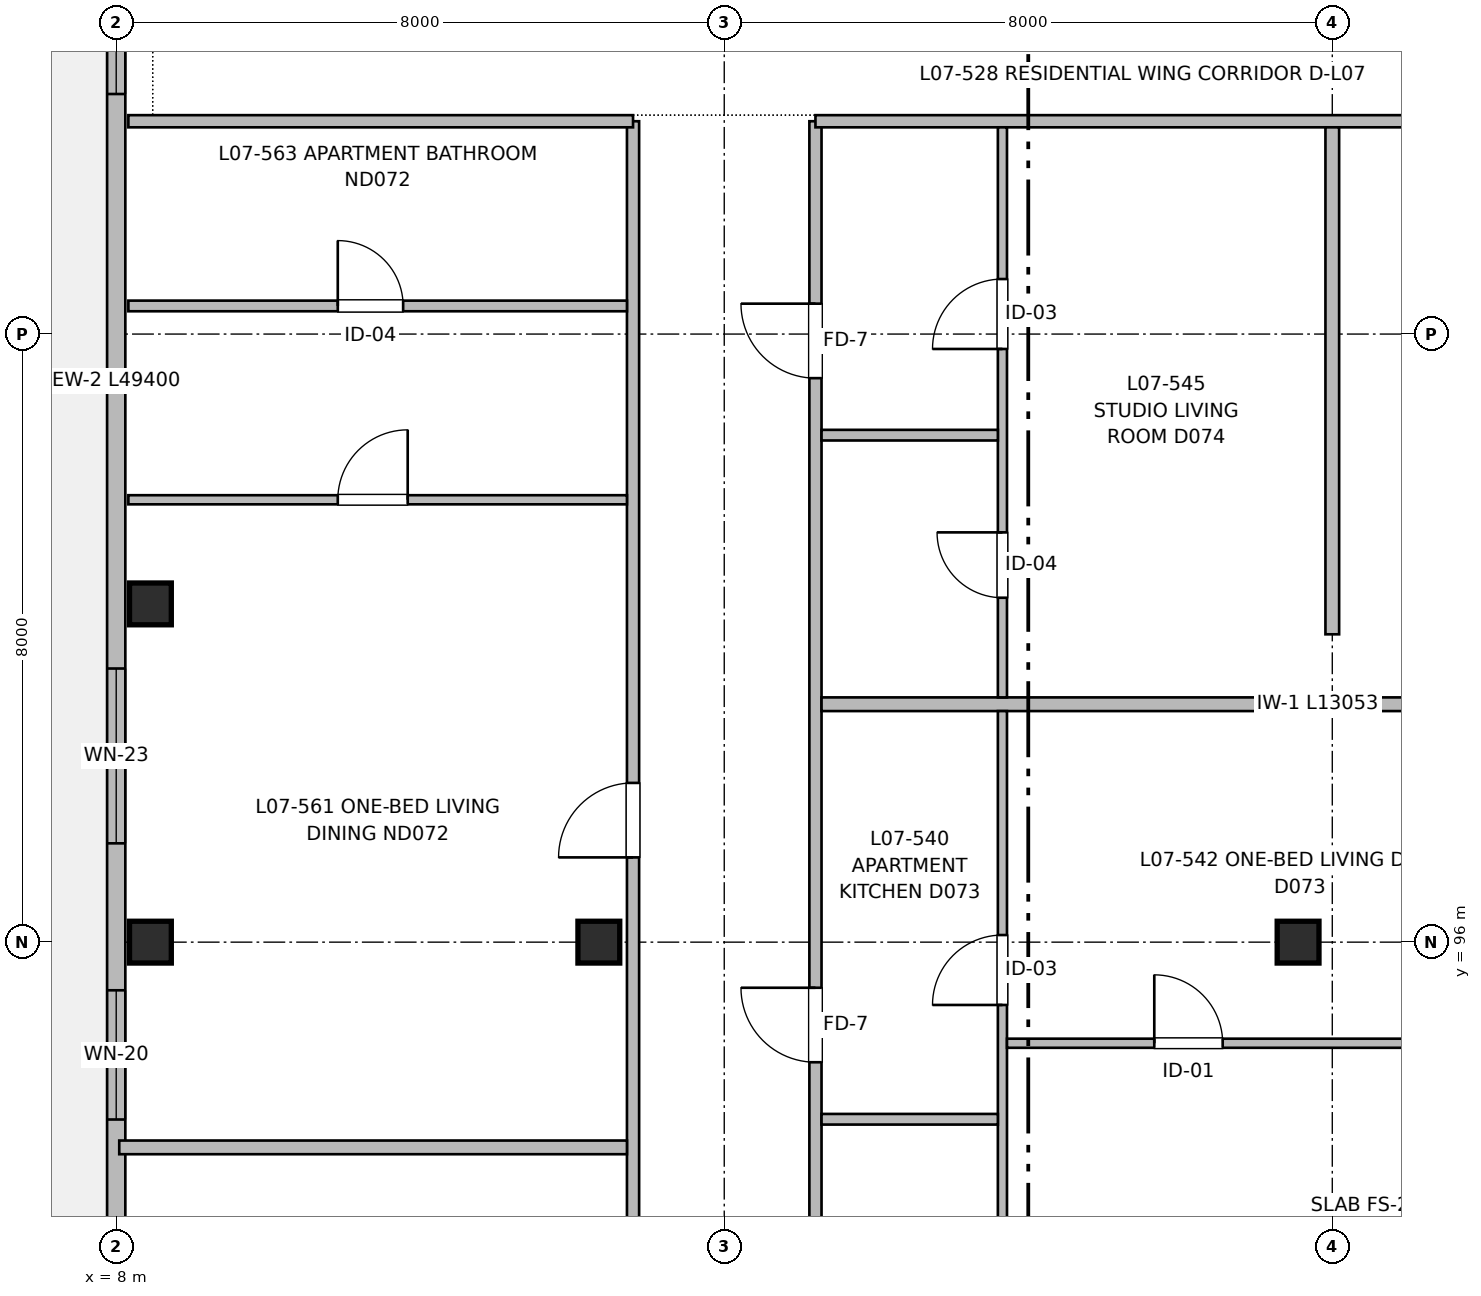
"""IFC4 building model, lengths in metres.
Left out: names, types, materials, properties, quantities, classifications, styles, units other than length and angle.
Written with IfcOpenShell. Run it as: python <this file> out.ifc"""

import sys

from ifc_helpers import new_model, si_unit, direction, frame, frame_2d, origin, origin_2d, place, context, subcontext, project, spatial, rectangle, extrude, element, fill, save


model = new_model("IFC4")
c1 = context("Model", 3, precision=1e-05, world=origin(), true_north=direction((0.0, 1.0)))
c2 = subcontext(c1, "Body", "Model", "MODEL_VIEW")
j1 = project(units=[si_unit("LENGTHUNIT", "METRE"), si_unit("PLANEANGLEUNIT", "RADIAN")], contexts=[c1])
p1 = place(None, origin())
s1 = spatial("IfcSite", under=j1, at=p1, CompositionType="ELEMENT")
p2 = place(p1, origin())
s2 = spatial("IfcBuilding", under=s1, at=p2, CompositionType="ELEMENT")
p3 = place(p2, frame((0.0, 0.0, 23.36)))
s3 = spatial("IfcBuildingStorey", under=s2, at=p3, CompositionType="ELEMENT", Elevation=23.36)
for number, where, z_axis, x_axis in (
    (1, (8.45, 96.0, 0.0), (0.0, 0.0, 1.0), (1.0, 0.0, 0.0)),
    (2, (8.45, 100.45, 0.0), (0.0, 0.0, 1.0), (1.0, 0.0, 0.0)),
    (3, (14.35, 96.0, 0.0), (0.0, 0.0, 1.0), (1.0, 0.0, 0.0)),
    (4, (23.55, 96.0, 0.0), (0.0, 0.0, 1.0), (1.0, 0.0, 0.0)),
):
    element("IfcColumn", number, at=place(p3, frame(where, z_axis=z_axis, x_axis=x_axis)), inside=s3, PredefinedType="COLUMN", context=c2, shape_type="SweptSolid", body=[
        extrude(rectangle(XDim=0.55, YDim=0.55, at=origin_2d()), origin(), (0.0, 0.0, 1.0), 3.2),
    ])
p4 = place(p3, frame((8.0, 64.4, 0.0), z_axis=(0.0, 0.0, 1.0), x_axis=(0.0, 1.0, 0.0)))
e5 = element("IfcWall", 5, at=p4, inside=s3, PredefinedType="SOLIDWALL", context=c2, shape_type="SweptSolid", body=[
    extrude(rectangle(XDim=49.4, YDim=0.24, at=frame_2d((24.7, 0.0))), origin(), (0.0, 0.0, 1.0), 2.98),
])
p5 = place(p4, frame((3.792, 0.0, 0.9)))
e6 = element("IfcOpeningElement", 6, at=p5, cuts=e5, PredefinedType="OPENING", context=c2, shape_type="SweptSolid", body=[
    extrude(rectangle(XDim=0.65, YDim=0.95, at=frame_2d((0.325, 0.475))), frame((0.0, 0.13, 0.0), z_axis=(0.0, -1.0, 0.0), x_axis=(1.0, 0.0, 0.0)), (0.0, 0.0, 1.0), 0.26),
])
p6 = place(p4, frame((11.8, 0.0, 0.62)))
e7 = element("IfcOpeningElement", 7, at=p6, cuts=e5, PredefinedType="OPENING", context=c2, shape_type="SweptSolid", body=[
    extrude(rectangle(XDim=1.1, YDim=1.6, at=frame_2d((0.55, 0.8))), frame((0.0, 0.13, 0.0), z_axis=(0.0, -1.0, 0.0), x_axis=(1.0, 0.0, 0.0)), (0.0, 0.0, 1.0), 0.26),
])
p7 = place(p4, frame((18.683, 0.0, 0.0)))
e8 = element("IfcOpeningElement", 8, at=p7, cuts=e5, PredefinedType="OPENING", context=c2, shape_type="SweptSolid", body=[
    extrude(rectangle(XDim=1.2, YDim=2.2, at=frame_2d((0.6, 1.1))), frame((0.0, 0.13, 0.0), z_axis=(0.0, -1.0, 0.0), x_axis=(1.0, 0.0, 0.0)), (0.0, 0.0, 1.0), 0.26),
])
p8 = place(p4, frame((21.883, 0.0, 0.72)))
e9 = element("IfcOpeningElement", 9, at=p8, cuts=e5, PredefinedType="OPENING", context=c2, shape_type="SweptSolid", body=[
    extrude(rectangle(XDim=1.8, YDim=1.5, at=frame_2d((0.9, 0.75))), frame((0.0, 0.13, 0.0), z_axis=(0.0, -1.0, 0.0), x_axis=(1.0, 0.0, 0.0)), (0.0, 0.0, 1.0), 0.26),
])
p9 = place(p4, frame((29.267, 0.0, 0.72)))
e10 = element("IfcOpeningElement", 10, at=p9, cuts=e5, PredefinedType="OPENING", context=c2, shape_type="SweptSolid", body=[
    extrude(rectangle(XDim=1.7, YDim=1.5, at=frame_2d((0.85, 0.75))), frame((0.0, 0.13, 0.0), z_axis=(0.0, -1.0, 0.0), x_axis=(1.0, 0.0, 0.0)), (0.0, 0.0, 1.0), 0.26),
])
p10 = place(p4, frame((32.9, 0.0, 0.57)))
e11 = element("IfcOpeningElement", 11, at=p10, cuts=e5, PredefinedType="OPENING", context=c2, shape_type="SweptSolid", body=[
    extrude(rectangle(XDim=2.3, YDim=1.65, at=frame_2d((1.15, 0.825))), frame((0.0, 0.13, 0.0), z_axis=(0.0, -1.0, 0.0), x_axis=(1.0, 0.0, 0.0)), (0.0, 0.0, 1.0), 0.26),
])
p11 = place(p4, frame((42.758, 0.0, 0.77)))
e12 = element("IfcOpeningElement", 12, at=p11, cuts=e5, PredefinedType="OPENING", context=c2, shape_type="SweptSolid", body=[
    extrude(rectangle(XDim=1.45, YDim=1.45, at=frame_2d((0.725, 0.725))), frame((0.0, 0.13, 0.0), z_axis=(0.0, -1.0, 0.0), x_axis=(1.0, 0.0, 0.0)), (0.0, 0.0, 1.0), 0.26),
])
p12 = place(p3, frame((14.8, 64.56, 0.0), z_axis=(0.0, 0.0, 1.0), x_axis=(0.0, 1.0, 0.0)))
e13 = element("IfcWall", 13, at=p12, inside=s3, PredefinedType="PARTITIONING", context=c2, shape_type="SweptSolid", body=[
    extrude(rectangle(XDim=42.24, YDim=0.16, at=frame_2d((21.12, 0.0))), origin(), (0.0, 0.0, 1.0), 2.935),
])
p13 = place(p12, frame((4.44, 0.0, 0.0)))
e14 = element("IfcOpeningElement", 14, at=p13, cuts=e13, PredefinedType="OPENING", context=c2, shape_type="SweptSolid", body=[
    extrude(rectangle(XDim=1.1, YDim=2.15, at=frame_2d((0.55, 1.075))), frame((0.0, 0.09, 0.0), z_axis=(0.0, -1.0, 0.0), x_axis=(1.0, 0.0, 0.0)), (0.0, 0.0, 1.0), 0.18),
])
p14 = place(p12, frame((10.84, 0.0, 0.0)))
e15 = element("IfcOpeningElement", 15, at=p14, cuts=e13, PredefinedType="OPENING", context=c2, shape_type="SweptSolid", body=[
    extrude(rectangle(XDim=1.6, YDim=2.15, at=frame_2d((0.8, 1.075))), frame((0.0, 0.09, 0.0), z_axis=(0.0, -1.0, 0.0), x_axis=(1.0, 0.0, 0.0)), (0.0, 0.0, 1.0), 0.18),
])
p15 = place(p12, frame((24.345, 0.0, 0.0)))
e16 = element("IfcOpeningElement", 16, at=p15, cuts=e13, PredefinedType="OPENING", context=c2, shape_type="SweptSolid", body=[
    extrude(rectangle(XDim=0.98, YDim=2.15, at=frame_2d((0.49, 1.075))), frame((0.0, 0.09, 0.0), z_axis=(0.0, -1.0, 0.0), x_axis=(1.0, 0.0, 0.0)), (0.0, 0.0, 1.0), 0.18),
])
p16 = place(p12, frame((32.555, 0.0, 0.0)))
e17 = element("IfcOpeningElement", 17, at=p16, cuts=e13, PredefinedType="OPENING", context=c2, shape_type="SweptSolid", body=[
    extrude(rectangle(XDim=0.98, YDim=2.15, at=frame_2d((0.49, 1.075))), frame((0.0, 0.09, 0.0), z_axis=(0.0, -1.0, 0.0), x_axis=(1.0, 0.0, 0.0)), (0.0, 0.0, 1.0), 0.18),
])
p17 = place(p3, frame((17.2, 64.56, 0.0), z_axis=(0.0, 0.0, 1.0), x_axis=(0.0, 1.0, 0.0)))
e18 = element("IfcWall", 18, at=p17, inside=s3, PredefinedType="PARTITIONING", context=c2, shape_type="SweptSolid", body=[
    extrude(rectangle(XDim=42.24, YDim=0.16, at=frame_2d((21.12, 0.0))), origin(), (0.0, 0.0, 1.0), 2.935),
])
p18 = place(p17, frame((6.53, 0.0, 0.0)))
e19 = element("IfcOpeningElement", 19, at=p18, cuts=e18, PredefinedType="OPENING", context=c2, shape_type="SweptSolid", body=[
    extrude(rectangle(XDim=0.98, YDim=2.15, at=frame_2d((0.49, 1.075))), frame((0.0, 0.09, 0.0), z_axis=(0.0, -1.0, 0.0), x_axis=(1.0, 0.0, 0.0)), (0.0, 0.0, 1.0), 0.18),
])
p19 = place(p17, frame((18.84, 0.0, 0.0)))
e20 = element("IfcOpeningElement", 20, at=p19, cuts=e18, PredefinedType="OPENING", context=c2, shape_type="SweptSolid", body=[
    extrude(rectangle(XDim=1.02, YDim=2.15, at=frame_2d((0.51, 1.075))), frame((0.0, 0.09, 0.0), z_axis=(0.0, -1.0, 0.0), x_axis=(1.0, 0.0, 0.0)), (0.0, 0.0, 1.0), 0.18),
])
p20 = place(p17, frame((29.86, 0.0, 0.0)))
e21 = element("IfcOpeningElement", 21, at=p20, cuts=e18, PredefinedType="OPENING", context=c2, shape_type="SweptSolid", body=[
    extrude(rectangle(XDim=0.98, YDim=2.15, at=frame_2d((0.49, 1.075))), frame((0.0, 0.09, 0.0), z_axis=(0.0, -1.0, 0.0), x_axis=(1.0, 0.0, 0.0)), (0.0, 0.0, 1.0), 0.18),
])
p21 = place(p17, frame((38.86, 0.0, 0.0)))
e22 = element("IfcOpeningElement", 22, at=p21, cuts=e18, PredefinedType="OPENING", context=c2, shape_type="SweptSolid", body=[
    extrude(rectangle(XDim=0.98, YDim=2.15, at=frame_2d((0.49, 1.075))), frame((0.0, 0.09, 0.0), z_axis=(0.0, -1.0, 0.0), x_axis=(1.0, 0.0, 0.0)), (0.0, 0.0, 1.0), 0.18),
])
p22 = place(p3, frame((8.16, 106.8, 0.0), z_axis=(0.0, 0.0, 1.0), x_axis=(1.0, 0.0, 0.0)))
e23 = element("IfcWall", 23, at=p22, inside=s3, PredefinedType="PARTITIONING", context=c2, shape_type="SweptSolid", body=[
    extrude(rectangle(XDim=6.64, YDim=0.16, at=frame_2d((3.32, 0.0))), origin(), (0.0, 0.0, 1.0), 2.935),
])
p23 = place(p3, frame((17.2, 106.8, 0.0), z_axis=(0.0, 0.0, 1.0), x_axis=(1.0, 0.0, 0.0)))
e24 = element("IfcWall", 24, at=p23, inside=s3, PredefinedType="PARTITIONING", context=c2, shape_type="SweptSolid", body=[
    extrude(rectangle(XDim=17.64, YDim=0.16, at=frame_2d((8.82, 0.0))), origin(), (0.0, 0.0, 1.0), 2.935),
])
p24 = place(p23, frame((13.075, 0.0, 0.0)))
e25 = element("IfcOpeningElement", 25, at=p24, cuts=e24, PredefinedType="OPENING", context=c2, shape_type="SweptSolid", body=[
    extrude(rectangle(XDim=1.05, YDim=2.15, at=frame_2d((0.525, 1.075))), frame((0.0, 0.09, 0.0), z_axis=(0.0, -1.0, 0.0), x_axis=(1.0, 0.0, 0.0)), (0.0, 0.0, 1.0), 0.18),
])
p25 = place(p3, frame((24.0, 100.05, 0.0), z_axis=(0.0, 0.0, 1.0), x_axis=(0.0, 1.0, 0.0)))
e26 = element("IfcWall", 26, at=p25, inside=s3, PredefinedType="PARTITIONING", context=c2, shape_type="SweptSolid", body=[
    extrude(rectangle(XDim=6.67, YDim=0.18, at=frame_2d((3.335, 0.0))), origin(), (0.0, 0.0, 1.0), 2.935),
])
p26 = place(p3, frame((17.28, 99.13, 0.0), z_axis=(0.0, 0.0, 1.0), x_axis=(1.0, 0.0, 0.0)))
e27 = element("IfcWall", 27, at=p26, inside=s3, PredefinedType="PARTITIONING", context=c2, shape_type="SweptSolid", body=[
    extrude(rectangle(XDim=13.053, YDim=0.18, at=frame_2d((6.527, 0.0))), origin(), (0.0, 0.0, 1.0), 2.935),
])
p27 = place(p3, frame((19.66, 89.1, 0.0), z_axis=(0.0, 0.0, 1.0), x_axis=(0.0, 1.0, 0.0)))
e28 = element("IfcWall", 28, at=p27, inside=s3, PredefinedType="PARTITIONING", context=c2, shape_type="SweptSolid", body=[
    extrude(rectangle(XDim=9.94, YDim=0.12, at=frame_2d((4.97, 0.0))), origin(), (0.0, 0.0, 1.0), 2.935),
])
p28 = place(p27, frame((1.737, 0.0, 0.0)))
e29 = element("IfcOpeningElement", 29, at=p28, cuts=e28, PredefinedType="OPENING", context=c2, shape_type="SweptSolid", body=[
    extrude(rectangle(XDim=0.86, YDim=2.1, at=frame_2d((0.43, 1.05))), frame((0.0, 0.07, 0.0), z_axis=(0.0, -1.0, 0.0), x_axis=(1.0, 0.0, 0.0)), (0.0, 0.0, 1.0), 0.14),
])
p29 = place(p27, frame((6.073, 0.0, 0.0)))
e30 = element("IfcOpeningElement", 30, at=p29, cuts=e28, PredefinedType="OPENING", context=c2, shape_type="SweptSolid", body=[
    extrude(rectangle(XDim=0.92, YDim=2.1, at=frame_2d((0.46, 1.05))), frame((0.0, 0.07, 0.0), z_axis=(0.0, -1.0, 0.0), x_axis=(1.0, 0.0, 0.0)), (0.0, 0.0, 1.0), 0.14),
])
p30 = place(p3, frame((17.28, 93.67, 0.0), z_axis=(0.0, 0.0, 1.0), x_axis=(1.0, 0.0, 0.0)))
e31 = element("IfcWall", 31, at=p30, inside=s3, PredefinedType="PARTITIONING", context=c2, shape_type="SweptSolid", body=[
    extrude(rectangle(XDim=2.32, YDim=0.14, at=frame_2d((1.16, 0.0))), origin(), (0.0, 0.0, 1.0), 2.935),
])
p31 = place(p3, frame((19.72, 94.67, 0.0), z_axis=(0.0, 0.0, 1.0), x_axis=(1.0, 0.0, 0.0)))
e32 = element("IfcWall", 32, at=p31, inside=s3, PredefinedType="PARTITIONING", context=c2, shape_type="SweptSolid", body=[
    extrude(rectangle(XDim=7.645, YDim=0.12, at=frame_2d((3.823, 0.0))), origin(), (0.0, 0.0, 1.0), 2.935),
])
p32 = place(p31, frame((1.938, 0.0, 0.0)))
e33 = element("IfcOpeningElement", 33, at=p32, cuts=e32, PredefinedType="OPENING", context=c2, shape_type="SweptSolid", body=[
    extrude(rectangle(XDim=0.9, YDim=2.1, at=frame_2d((0.45, 1.05))), frame((0.0, 0.07, 0.0), z_axis=(0.0, -1.0, 0.0), x_axis=(1.0, 0.0, 0.0)), (0.0, 0.0, 1.0), 0.14),
])
p33 = place(p3, frame((19.66, 99.22, 0.0), z_axis=(0.0, 0.0, 1.0), x_axis=(0.0, 1.0, 0.0)))
e34 = element("IfcWall", 34, at=p33, inside=s3, PredefinedType="PARTITIONING", context=c2, shape_type="SweptSolid", body=[
    extrude(rectangle(XDim=7.5, YDim=0.12, at=frame_2d((3.75, 0.0))), origin(), (0.0, 0.0, 1.0), 2.935),
])
p34 = place(p33, frame((1.311, 0.0, 0.0)))
e35 = element("IfcOpeningElement", 35, at=p34, cuts=e34, PredefinedType="OPENING", context=c2, shape_type="SweptSolid", body=[
    extrude(rectangle(XDim=0.86, YDim=2.1, at=frame_2d((0.43, 1.05))), frame((0.0, 0.07, 0.0), z_axis=(0.0, -1.0, 0.0), x_axis=(1.0, 0.0, 0.0)), (0.0, 0.0, 1.0), 0.14),
])
p35 = place(p33, frame((4.584, 0.0, 0.0)))
e36 = element("IfcOpeningElement", 36, at=p35, cuts=e34, PredefinedType="OPENING", context=c2, shape_type="SweptSolid", body=[
    extrude(rectangle(XDim=0.92, YDim=2.1, at=frame_2d((0.46, 1.05))), frame((0.0, 0.07, 0.0), z_axis=(0.0, -1.0, 0.0), x_axis=(1.0, 0.0, 0.0)), (0.0, 0.0, 1.0), 0.14),
])
p36 = place(p3, frame((17.28, 102.67, 0.0), z_axis=(0.0, 0.0, 1.0), x_axis=(1.0, 0.0, 0.0)))
e37 = element("IfcWall", 37, at=p36, inside=s3, PredefinedType="PARTITIONING", context=c2, shape_type="SweptSolid", body=[
    extrude(rectangle(XDim=2.32, YDim=0.14, at=frame_2d((1.16, 0.0))), origin(), (0.0, 0.0, 1.0), 2.935),
])
p37 = place(p3, frame((8.04, 93.3, 0.0), z_axis=(0.0, 0.0, 1.0), x_axis=(1.0, 0.0, 0.0)))
e38 = element("IfcWall", 38, at=p37, inside=s3, PredefinedType="PARTITIONING", context=c2, shape_type="SweptSolid", body=[
    extrude(rectangle(XDim=6.68, YDim=0.18, at=frame_2d((3.34, 0.0))), origin(), (0.0, 0.0, 1.0), 2.935),
])
p38 = place(p3, frame((8.16, 101.82, 0.0), z_axis=(0.0, 0.0, 1.0), x_axis=(1.0, 0.0, 0.0)))
e39 = element("IfcWall", 39, at=p38, inside=s3, PredefinedType="PARTITIONING", context=c2, shape_type="SweptSolid", body=[
    extrude(rectangle(XDim=6.56, YDim=0.12, at=frame_2d((3.28, 0.0))), origin(), (0.0, 0.0, 1.0), 2.935),
])
p39 = place(p38, frame((2.755, 0.0, 0.0)))
e40 = element("IfcOpeningElement", 40, at=p39, cuts=e39, PredefinedType="OPENING", context=c2, shape_type="SweptSolid", body=[
    extrude(rectangle(XDim=0.92, YDim=2.1, at=frame_2d((0.46, 1.05))), frame((0.0, 0.07, 0.0), z_axis=(0.0, -1.0, 0.0), x_axis=(1.0, 0.0, 0.0)), (0.0, 0.0, 1.0), 0.14),
])
p40 = place(p3, frame((8.16, 104.37, 0.0), z_axis=(0.0, 0.0, 1.0), x_axis=(1.0, 0.0, 0.0)))
e41 = element("IfcWall", 41, at=p40, inside=s3, PredefinedType="PARTITIONING", context=c2, shape_type="SweptSolid", body=[
    extrude(rectangle(XDim=6.56, YDim=0.14, at=frame_2d((3.28, 0.0))), origin(), (0.0, 0.0, 1.0), 2.935),
])
p41 = place(p40, frame((2.755, 0.0, 0.0)))
e42 = element("IfcOpeningElement", 42, at=p41, cuts=e41, PredefinedType="OPENING", context=c2, shape_type="SweptSolid", body=[
    extrude(rectangle(XDim=0.86, YDim=2.1, at=frame_2d((0.43, 1.05))), frame((0.0, 0.08, 0.0), z_axis=(0.0, -1.0, 0.0), x_axis=(1.0, 0.0, 0.0)), (0.0, 0.0, 1.0), 0.16),
])
p42 = place(p9, origin())
e43 = element("IfcWindow", 43, at=p42, inside=s3, PartitioningType="SINGLE_PANEL", PredefinedType="WINDOW", context=c2, shape_type="SweptSolid", body=[
    extrude(rectangle(XDim=1.7, YDim=1.5, at=frame_2d((0.85, 0.75))), frame((0.0, 0.03, 0.0), z_axis=(0.0, -1.0, 0.0), x_axis=(1.0, 0.0, 0.0)), (0.0, 0.0, 1.0), 0.06),
])
fill(e10, e43)
p43 = place(p10, origin())
e44 = element("IfcWindow", 44, at=p43, inside=s3, PartitioningType="SINGLE_PANEL", PredefinedType="WINDOW", context=c2, shape_type="SweptSolid", body=[
    extrude(rectangle(XDim=2.3, YDim=1.65, at=frame_2d((1.15, 0.825))), frame((0.0, 0.03, 0.0), z_axis=(0.0, -1.0, 0.0), x_axis=(1.0, 0.0, 0.0)), (0.0, 0.0, 1.0), 0.06),
])
fill(e11, e44)
p44 = place(p11, origin())
e45 = element("IfcWindow", 45, at=p44, inside=s3, PartitioningType="SINGLE_PANEL", PredefinedType="WINDOW", context=c2, shape_type="SweptSolid", body=[
    extrude(rectangle(XDim=1.45, YDim=1.45, at=frame_2d((0.725, 0.725))), frame((0.0, 0.03, 0.0), z_axis=(0.0, -1.0, 0.0), x_axis=(1.0, 0.0, 0.0)), (0.0, 0.0, 1.0), 0.06),
])
fill(e12, e45)
p45 = place(p29, origin())
e46 = element("IfcDoor", 46, at=p45, inside=s3, OperationType="SINGLE_SWING_LEFT", PredefinedType="DOOR", context=c2, shape_type="SweptSolid", body=[
    extrude(rectangle(XDim=0.92, YDim=2.1, at=frame_2d((0.46, 1.05))), frame((0.0, 0.025, 0.0), z_axis=(0.0, -1.0, 0.0), x_axis=(1.0, 0.0, 0.0)), (0.0, 0.0, 1.0), 0.05),
])
fill(e30, e46)
p46 = place(p20, origin())
e47 = element("IfcDoor", 47, at=p46, inside=s3, OperationType="SINGLE_SWING_RIGHT", PredefinedType="DOOR", context=c2, shape_type="SweptSolid", body=[
    extrude(rectangle(XDim=0.98, YDim=2.15, at=frame_2d((0.49, 1.075))), frame((0.0, 0.025, 0.0), z_axis=(0.0, -1.0, 0.0), x_axis=(1.0, 0.0, 0.0)), (0.0, 0.0, 1.0), 0.05),
])
fill(e21, e47)
p47 = place(p32, origin())
e48 = element("IfcDoor", 48, at=p47, inside=s3, OperationType="SINGLE_SWING_LEFT", PredefinedType="DOOR", context=c2, shape_type="SweptSolid", body=[
    extrude(rectangle(XDim=0.9, YDim=2.1, at=frame_2d((0.45, 1.05))), frame((0.0, 0.025, 0.0), z_axis=(0.0, -1.0, 0.0), x_axis=(1.0, 0.0, 0.0)), (0.0, 0.0, 1.0), 0.05),
])
fill(e33, e48)
p48 = place(p34, origin())
e49 = element("IfcDoor", 49, at=p48, inside=s3, OperationType="SINGLE_SWING_RIGHT", PredefinedType="DOOR", context=c2, shape_type="SweptSolid", body=[
    extrude(rectangle(XDim=0.86, YDim=2.1, at=frame_2d((0.43, 1.05))), frame((0.0, 0.025, 0.0), z_axis=(0.0, -1.0, 0.0), x_axis=(1.0, 0.0, 0.0)), (0.0, 0.0, 1.0), 0.05),
])
fill(e35, e49)
p49 = place(p35, origin())
e50 = element("IfcDoor", 50, at=p49, inside=s3, OperationType="SINGLE_SWING_LEFT", PredefinedType="DOOR", context=c2, shape_type="SweptSolid", body=[
    extrude(rectangle(XDim=0.92, YDim=2.1, at=frame_2d((0.46, 1.05))), frame((0.0, 0.025, 0.0), z_axis=(0.0, -1.0, 0.0), x_axis=(1.0, 0.0, 0.0)), (0.0, 0.0, 1.0), 0.05),
])
fill(e36, e50)
p50 = place(p21, origin())
e51 = element("IfcDoor", 51, at=p50, inside=s3, OperationType="SINGLE_SWING_RIGHT", PredefinedType="DOOR", context=c2, shape_type="SweptSolid", body=[
    extrude(rectangle(XDim=0.98, YDim=2.15, at=frame_2d((0.49, 1.075))), frame((0.0, 0.025, 0.0), z_axis=(0.0, -1.0, 0.0), x_axis=(1.0, 0.0, 0.0)), (0.0, 0.0, 1.0), 0.05),
])
fill(e22, e51)
p51 = place(p41, origin())
e52 = element("IfcDoor", 52, at=p51, inside=s3, OperationType="SINGLE_SWING_LEFT", PredefinedType="DOOR", context=c2, shape_type="SweptSolid", body=[
    extrude(rectangle(XDim=0.86, YDim=2.1, at=frame_2d((0.43, 1.05))), frame((0.0, 0.025, 0.0), z_axis=(0.0, -1.0, 0.0), x_axis=(1.0, 0.0, 0.0)), (0.0, 0.0, 1.0), 0.05),
])
fill(e42, e52)
p52 = place(p39, origin())
e53 = element("IfcDoor", 53, at=p52, inside=s3, OperationType="SINGLE_SWING_RIGHT", PredefinedType="DOOR", context=c2, shape_type="SweptSolid", body=[
    extrude(rectangle(XDim=0.92, YDim=2.1, at=frame_2d((0.46, 1.05))), frame((0.0, 0.025, 0.0), z_axis=(0.0, -1.0, 0.0), x_axis=(1.0, 0.0, 0.0)), (0.0, 0.0, 1.0), 0.05),
])
fill(e40, e53)
p53 = place(p16, origin())
e54 = element("IfcDoor", 54, at=p53, inside=s3, OperationType="SINGLE_SWING_LEFT", PredefinedType="DOOR", context=c2, shape_type="SweptSolid", body=[
    extrude(rectangle(XDim=0.98, YDim=2.15, at=frame_2d((0.49, 1.075))), frame((0.0, 0.025, 0.0), z_axis=(0.0, -1.0, 0.0), x_axis=(1.0, 0.0, 0.0)), (0.0, 0.0, 1.0), 0.05),
])
fill(e17, e54)
save(model, sys.argv[1])
